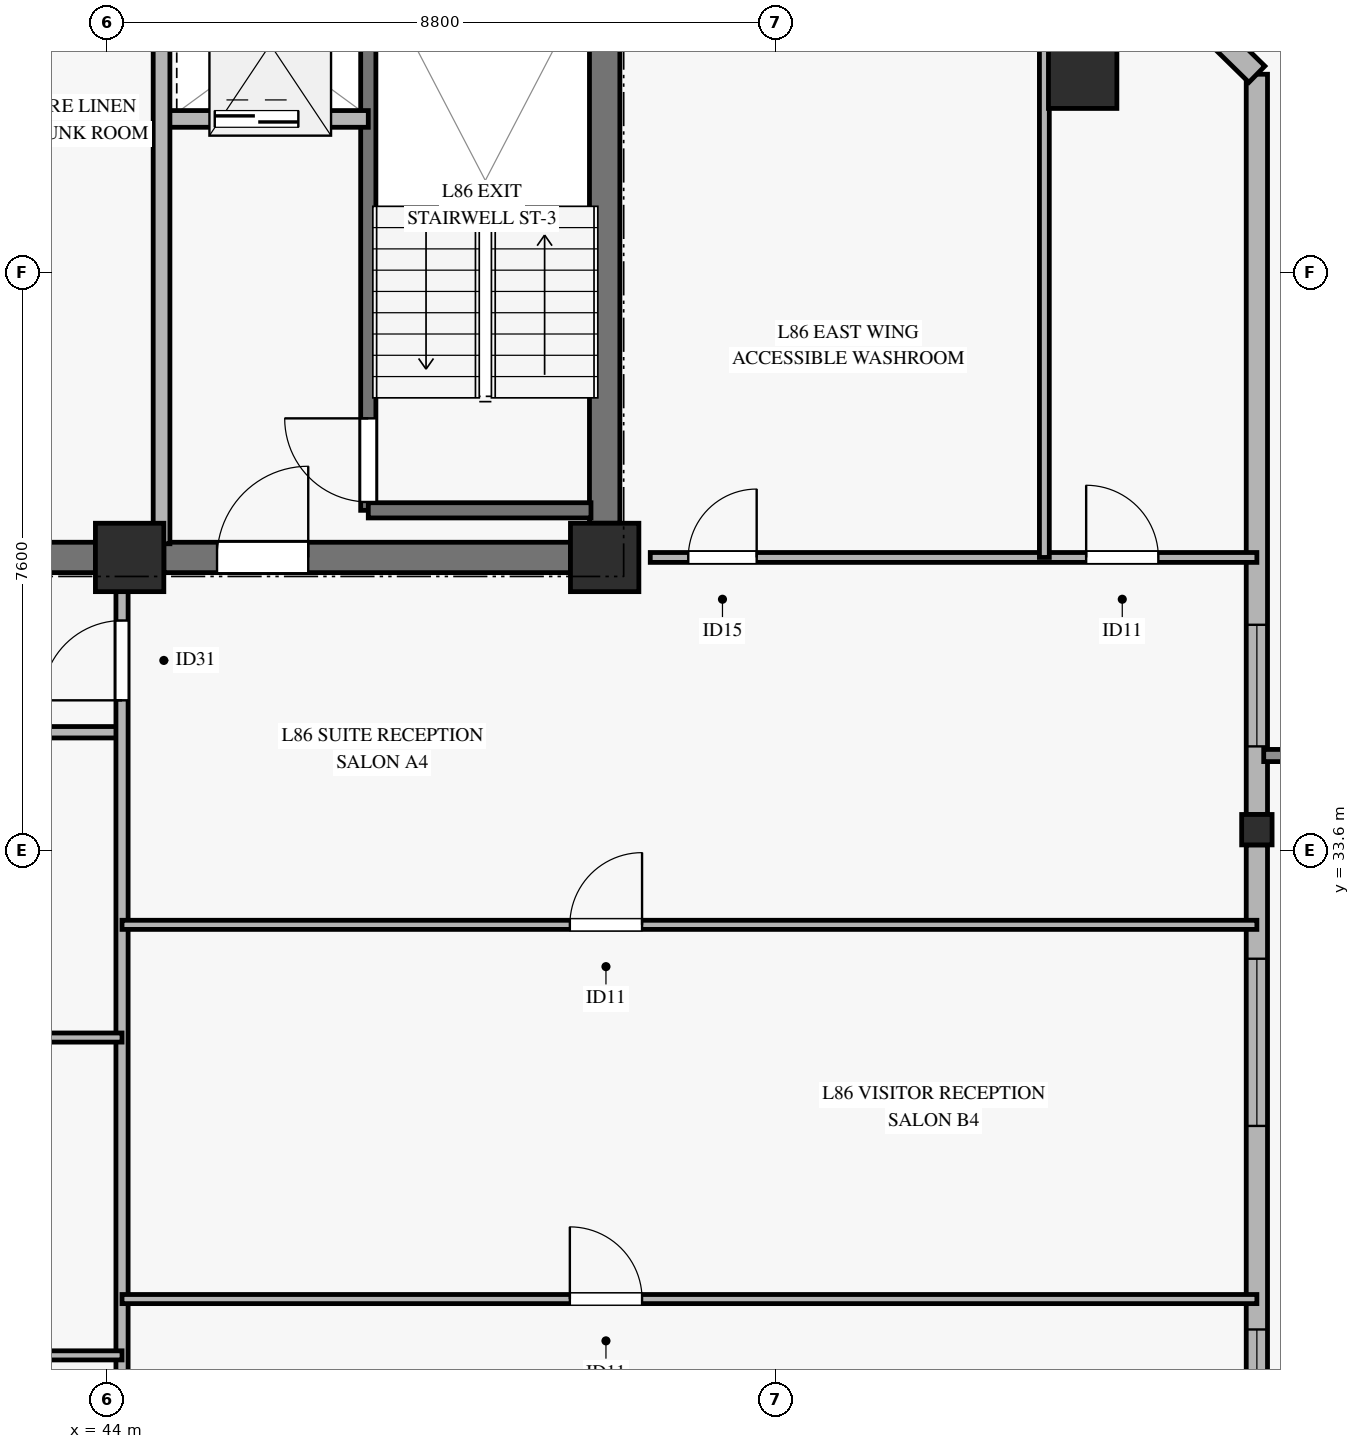
"""IFC4 building model, lengths in metres.
Left out: names, types, materials, properties, quantities, classifications, styles, units other than length and angle.
Written with IfcOpenShell. Run it as: python <this file> out.ifc"""

import sys

from ifc_helpers import new_model, si_unit, direction, frame, frame_2d, origin, origin_2d, place, context, subcontext, project, spatial, rectangle, hollow_rectangle, extrude, source, transform, mapped, element, fill, save


model = new_model("IFC4")
c1 = context("Model", 3, precision=1e-05, world=origin(), true_north=direction((0.0, 1.0)))
c2 = subcontext(c1, "Body", "Model", "MODEL_VIEW")
j1 = project(units=[si_unit("LENGTHUNIT", "METRE"), si_unit("PLANEANGLEUNIT", "RADIAN")], contexts=[c1])
p1 = place(None, origin())
s1 = spatial("IfcSite", under=j1, at=p1, CompositionType="ELEMENT")
p2 = place(p1, origin())
s2 = spatial("IfcBuilding", under=s1, at=p2, CompositionType="ELEMENT")
p3 = place(p2, frame((0.0, 0.0, 332.3)))
s3 = spatial("IfcBuildingStorey", under=s2, at=p3, CompositionType="ELEMENT", Elevation=332.3)
m1 = source(origin(), c2, "Body", "SweptSolid", [
    extrude(rectangle(XDim=0.9, YDim=0.9, at=origin_2d()), origin(), (0.0, 0.0, 1.0), 3.185),
])
for number, where, z_axis, x_axis in (
    (1, (44.3, 37.45, 0.0), (0.0, 0.0, 1.0), (1.0, 0.0, 0.0)),
    (2, (50.55, 37.45, 0.0), (0.0, 0.0, 1.0), (1.0, 0.0, 0.0)),
):
    element("IfcColumn", number, at=place(p3, frame(where, z_axis=z_axis, x_axis=x_axis)), inside=s3, PredefinedType="PILASTER", context=c2, shape_type="MappedRepresentation", body=[
        mapped(m1, transform((0.0, 0.0, 0.0), x_axis=(1.0, 0.0, 0.0), y_axis=(0.0, 1.0, 0.0), z_axis=(0.0, 0.0, 1.0), scale=1.0)),
    ])
p4 = place(p3, frame((36.05, 37.45, 0.0), z_axis=(0.0, 0.0, 1.0), x_axis=(1.0, 0.0, 0.0)))
e3 = element("IfcWall", 3, at=p4, inside=s3, PredefinedType="SHEAR", context=c2, shape_type="SweptSolid", body=[
    extrude(rectangle(XDim=7.8, YDim=0.4, at=frame_2d((3.9, 0.0))), origin(), (0.0, 0.0, 1.0), 3.185),
])
p5 = place(p3, frame((44.75, 37.45, 0.0), z_axis=(0.0, 0.0, 1.0), x_axis=(1.0, 0.0, 0.0)))
e4 = element("IfcWall", 4, at=p5, inside=s3, PredefinedType="SHEAR", context=c2, shape_type="SweptSolid", body=[
    extrude(rectangle(XDim=5.35, YDim=0.4, at=frame_2d((2.675, 0.0))), origin(), (0.0, 0.0, 1.0), 3.185),
])
p6 = place(p5, frame((0.7, 0.0, 0.0)))
e5 = element("IfcOpeningElement", 5, at=p6, cuts=e4, PredefinedType="OPENING", context=c2, shape_type="SweptSolid", body=[
    extrude(rectangle(XDim=1.2, YDim=2.15, at=frame_2d((0.6, 1.075))), frame((0.0, 0.21, 0.0), z_axis=(0.0, -1.0, 0.0), x_axis=(1.0, 0.0, 0.0)), (0.0, 0.0, 1.0), 0.42),
])
p7 = place(p3, frame((50.55, 37.9, 0.0), z_axis=(0.0, 0.0, 1.0), x_axis=(0.0, 1.0, 0.0)))
e6 = element("IfcWall", 6, at=p7, inside=s3, PredefinedType="SHEAR", context=c2, shape_type="SweptSolid", body=[
    extrude(rectangle(XDim=8.2, YDim=0.4, at=frame_2d((4.1, 0.0))), origin(), (0.0, 0.0, 1.0), 3.185),
])
m2 = source(origin(), c2, "Body", "SweptSolid", [
    extrude(hollow_rectangle(XDim=0.9, YDim=0.9, WallThickness=0.04, at=origin_2d()), origin(), (0.0, 0.0, 1.0), 3.207),
])
p8 = place(p3, frame((56.839, 43.808, 0.0), z_axis=(-0.1154156576, 0.01431275965, 0.993214161645), x_axis=(-0.123067857845, -0.992398257942, 0.0)))
e7 = element("IfcColumn", 7, at=p8, inside=s3, PredefinedType="COLUMN", context=c2, shape_type="MappedRepresentation", body=[
    mapped(m2, transform((0.0, 0.0, 0.0), x_axis=(1.0, 0.0, 0.0), y_axis=(0.0, 1.0, 0.0), z_axis=(0.0, 0.0, 1.0), scale=1.0)),
])
m3 = source(origin(), c2, "Body", "SweptSolid", [
    extrude(hollow_rectangle(XDim=0.4, YDim=0.4, WallThickness=0.02, at=origin_2d()), origin(), (0.0, 0.0, 1.0), 3.246),
])
p9 = place(p3, frame((59.131, 33.868, 0.0), z_axis=(-0.128172477041, 0.143592287953, 0.981301722698), x_axis=(-0.746027795602, -0.665914805504, 0.0)))
e8 = element("IfcColumn", 8, at=p9, inside=s3, PredefinedType="COLUMN", context=c2, shape_type="MappedRepresentation", body=[
    mapped(m3, transform((0.0, 0.0, 0.0), x_axis=(1.0, 0.0, 0.0), y_axis=(0.0, 1.0, 0.0), z_axis=(0.0, 0.0, 1.0), scale=1.0)),
])
p10 = place(p3, frame((59.131, 23.928, 0.0), z_axis=(0.0, 0.0, 1.0), x_axis=(0.0, 1.0, 0.0)))
e9 = element("IfcWall", 9, at=p10, inside=s3, PredefinedType="SOLIDWALL", context=c2, shape_type="SweptSolid", body=[
    extrude(rectangle(XDim=9.74, YDim=0.28, at=frame_2d((4.87, 0.0))), origin(), (0.0, 0.0, 1.0), 2.815),
])
p11 = place(p10, frame((1.164, 0.0, 0.45)))
e10 = element("IfcOpeningElement", 10, at=p11, cuts=e9, PredefinedType="OPENING", context=c2, shape_type="SweptSolid", body=[
    extrude(rectangle(XDim=2.2, YDim=2.1, at=frame_2d((1.1, 1.05))), frame((0.0, 0.15, 0.0), z_axis=(0.0, -1.0, 0.0), x_axis=(1.0, 0.0, 0.0)), (0.0, 0.0, 1.0), 0.3),
])
p12 = place(p10, frame((6.042, 0.0, 0.45)))
e11 = element("IfcOpeningElement", 11, at=p12, cuts=e9, PredefinedType="OPENING", context=c2, shape_type="SweptSolid", body=[
    extrude(rectangle(XDim=2.2, YDim=2.1, at=frame_2d((1.1, 1.05))), frame((0.0, 0.15, 0.0), z_axis=(0.0, -1.0, 0.0), x_axis=(1.0, 0.0, 0.0)), (0.0, 0.0, 1.0), 0.3),
])
p13 = place(p3, frame((59.131, 34.068, 0.0), z_axis=(0.0, 0.0, 1.0), x_axis=(0.0, 1.0, 0.0)))
e12 = element("IfcWall", 12, at=p13, inside=s3, PredefinedType="SOLIDWALL", context=c2, shape_type="SweptSolid", body=[
    extrude(rectangle(XDim=9.74, YDim=0.28, at=frame_2d((4.87, 0.0))), origin(), (0.0, 0.0, 1.0), 2.815),
])
p14 = place(p13, frame((0.896, 0.0, 0.45)))
e13 = element("IfcOpeningElement", 13, at=p14, cuts=e12, PredefinedType="OPENING", context=c2, shape_type="SweptSolid", body=[
    extrude(rectangle(XDim=1.6, YDim=2.0, at=frame_2d((0.8, 1.0))), frame((0.0, 0.15, 0.0), z_axis=(0.0, -1.0, 0.0), x_axis=(1.0, 0.0, 0.0)), (0.0, 0.0, 1.0), 0.3),
])
p15 = place(p3, frame((59.131, 43.808, 0.0), z_axis=(0.0, 0.0, 1.0), x_axis=(-0.7142771975, 0.699862904526, 0.0)))
e14 = element("IfcWall", 14, at=p15, inside=s3, PredefinedType="SOLIDWALL", context=c2, shape_type="SweptSolid", body=[
    extrude(rectangle(XDim=3.489, YDim=0.3, at=frame_2d((1.745, 0.0))), origin(), (0.0, 0.0, 1.0), 2.815),
])
p16 = place(p15, frame((0.945, 0.0, 0.45)))
e15 = element("IfcOpeningElement", 15, at=p16, cuts=e14, PredefinedType="OPENING", context=c2, shape_type="SweptSolid", body=[
    extrude(rectangle(XDim=1.6, YDim=2.0, at=frame_2d((0.8, 1.0))), frame((0.0, 0.16, 0.0), z_axis=(0.0, -1.0, 0.0), x_axis=(1.0, 0.0, 0.0)), (0.0, 0.0, 1.0), 0.32),
])
p17 = place(p3, frame((47.44, 38.07, 0.0), z_axis=(0.0, 0.0, 1.0), x_axis=(0.0, 1.0, 0.0)))
e16 = element("IfcWall", 16, at=p17, inside=s3, PredefinedType="SOLIDWALL", context=c2, shape_type="SweptSolid", body=[
    extrude(rectangle(XDim=7.25, YDim=0.2, at=frame_2d((3.625, 0.0))), origin(), (0.0, 0.0, 1.0), 3.4),
])
p18 = place(p17, frame((0.11, 0.0, 0.0)))
e17 = element("IfcOpeningElement", 17, at=p18, cuts=e16, PredefinedType="OPENING", context=c2, shape_type="SweptSolid", body=[
    extrude(rectangle(XDim=1.1, YDim=2.15, at=frame_2d((0.55, 1.075))), frame((0.0, 0.11, 0.0), z_axis=(0.0, -1.0, 0.0), x_axis=(1.0, 0.0, 0.0)), (0.0, 0.0, 1.0), 0.22),
])
p19 = place(p3, frame((47.44, 38.07, 0.0), z_axis=(0.0, 0.0, 1.0), x_axis=(1.0, 0.0, 0.0)))
e18 = element("IfcWall", 18, at=p19, inside=s3, PredefinedType="SOLIDWALL", context=c2, shape_type="SweptSolid", body=[
    extrude(rectangle(XDim=2.93, YDim=0.2, at=frame_2d((1.465, 0.0))), origin(), (0.0, 0.0, 1.0), 3.4),
])
p20 = place(p3, frame((44.72, 43.22, 0.0), z_axis=(0.0, 0.0, 1.0), x_axis=(1.0, 0.0, 0.0)))
e19 = element("IfcWall", 19, at=p20, inside=s3, PredefinedType="SOLIDWALL", context=c2, shape_type="SweptSolid", body=[
    extrude(rectangle(XDim=2.72, YDim=0.22, at=frame_2d((1.36, 0.0))), origin(), (0.0, 0.0, 1.0), 3.185),
])
p21 = place(p20, frame((0.7, 0.0, 0.0)))
e20 = element("IfcOpeningElement", 20, at=p21, cuts=e19, PredefinedType="OPENING", context=c2, shape_type="SweptSolid", body=[
    extrude(rectangle(XDim=1.1, YDim=2.2, at=frame_2d((0.55, 1.1))), frame((0.0, 0.12, 0.0), z_axis=(0.0, -1.0, 0.0), x_axis=(1.0, 0.0, 0.0)), (0.0, 0.0, 1.0), 0.24),
])
p22 = place(p3, frame((44.72, 37.63, 0.0), z_axis=(0.0, 0.0, 1.0), x_axis=(0.0, 1.0, 0.0)))
e21 = element("IfcWall", 21, at=p22, inside=s3, PredefinedType="SOLIDWALL", context=c2, shape_type="SweptSolid", body=[
    extrude(rectangle(XDim=7.59, YDim=0.22, at=frame_2d((3.795, 0.0))), origin(), (0.0, 0.0, 1.0), 3.185),
])
p23 = place(p3, frame((21.0, 35.15, 0.0), z_axis=(0.0, 0.0, 1.0), x_axis=(1.0, 0.0, 0.0)))
e22 = element("IfcWall", 22, at=p23, inside=s3, PredefinedType="PARTITIONING", context=c2, shape_type="SweptSolid", body=[
    extrude(rectangle(XDim=23.2, YDim=0.15, at=frame_2d((11.6, 0.0))), origin(), (0.0, 0.0, 1.0), 2.47),
])
p24 = place(p23, frame((4.577, 0.0, 0.0)))
e23 = element("IfcOpeningElement", 23, at=p24, cuts=e22, PredefinedType="OPENING", context=c2, shape_type="SweptSolid", body=[
    extrude(rectangle(XDim=1.05, YDim=2.15, at=frame_2d((0.525, 1.075))), frame((0.0, 0.085, 0.0), z_axis=(0.0, -1.0, 0.0), x_axis=(1.0, 0.0, 0.0)), (0.0, 0.0, 1.0), 0.17),
])
p25 = place(p23, frame((16.177, 0.0, 0.0)))
e24 = element("IfcOpeningElement", 24, at=p25, cuts=e22, PredefinedType="OPENING", context=c2, shape_type="SweptSolid", body=[
    extrude(rectangle(XDim=1.05, YDim=2.15, at=frame_2d((0.525, 1.075))), frame((0.0, 0.085, 0.0), z_axis=(0.0, -1.0, 0.0), x_axis=(1.0, 0.0, 0.0)), (0.0, 0.0, 1.0), 0.17),
])
p26 = place(p3, frame((44.2, 21.636, 0.0), z_axis=(0.0, 0.0, 1.0), x_axis=(0.0, 1.0, 0.0)))
e25 = element("IfcWall", 25, at=p26, inside=s3, PredefinedType="PARTITIONING", context=c2, shape_type="SweptSolid", body=[
    extrude(rectangle(XDim=15.814, YDim=0.16, at=frame_2d((7.907, 0.0))), origin(), (0.0, 0.0, 1.0), 2.47),
])
p27 = place(p26, frame((13.934, 0.0, 0.0)))
e26 = element("IfcOpeningElement", 26, at=p27, cuts=e25, PredefinedType="OPENING", context=c2, shape_type="SweptSolid", body=[
    extrude(rectangle(XDim=1.05, YDim=2.15, at=frame_2d((0.525, 1.075))), frame((0.0, 0.09, 0.0), z_axis=(0.0, -1.0, 0.0), x_axis=(1.0, 0.0, 0.0)), (0.0, 0.0, 1.0), 0.18),
])
p28 = place(p3, frame((32.6, 26.951, 0.0), z_axis=(0.0, 0.0, 1.0), x_axis=(1.0, 0.0, 0.0)))
e27 = element("IfcWall", 27, at=p28, inside=s3, PredefinedType="PARTITIONING", context=c2, shape_type="SweptSolid", body=[
    extrude(rectangle(XDim=11.6, YDim=0.12, at=frame_2d((5.8, 0.0))), origin(), (0.0, 0.0, 1.0), 2.47),
])
p29 = place(p28, frame((4.806, 0.0, 0.0)))
e28 = element("IfcOpeningElement", 28, at=p29, cuts=e27, PredefinedType="OPENING", context=c2, shape_type="SweptSolid", body=[
    extrude(rectangle(XDim=0.95, YDim=2.1, at=frame_2d((0.475, 1.05))), frame((0.0, 0.07, 0.0), z_axis=(0.0, -1.0, 0.0), x_axis=(1.0, 0.0, 0.0)), (0.0, 0.0, 1.0), 0.14),
])
p30 = place(p3, frame((32.6, 31.133, 0.0), z_axis=(0.0, 0.0, 1.0), x_axis=(1.0, 0.0, 0.0)))
e29 = element("IfcWall", 29, at=p30, inside=s3, PredefinedType="PARTITIONING", context=c2, shape_type="SweptSolid", body=[
    extrude(rectangle(XDim=11.6, YDim=0.12, at=frame_2d((5.8, 0.0))), origin(), (0.0, 0.0, 1.0), 2.47),
])
p31 = place(p30, frame((4.806, 0.0, 0.0)))
e30 = element("IfcOpeningElement", 30, at=p31, cuts=e29, PredefinedType="OPENING", context=c2, shape_type="SweptSolid", body=[
    extrude(rectangle(XDim=0.95, YDim=2.1, at=frame_2d((0.475, 1.05))), frame((0.0, 0.07, 0.0), z_axis=(0.0, -1.0, 0.0), x_axis=(1.0, 0.0, 0.0)), (0.0, 0.0, 1.0), 0.14),
])
p32 = place(p3, frame((44.2, 27.692, 0.0), z_axis=(0.0, 0.0, 1.0), x_axis=(1.0, 0.0, 0.0)))
e31 = element("IfcWall", 31, at=p32, inside=s3, PredefinedType="PARTITIONING", context=c2, shape_type="SweptSolid", body=[
    extrude(rectangle(XDim=14.931, YDim=0.12, at=frame_2d((7.466, 0.0))), origin(), (0.0, 0.0, 1.0), 2.47),
])
p33 = place(p32, frame((5.892, 0.0, 0.0)))
e32 = element("IfcOpeningElement", 32, at=p33, cuts=e31, PredefinedType="OPENING", context=c2, shape_type="SweptSolid", body=[
    extrude(rectangle(XDim=0.95, YDim=2.1, at=frame_2d((0.475, 1.05))), frame((0.0, 0.07, 0.0), z_axis=(0.0, -1.0, 0.0), x_axis=(1.0, 0.0, 0.0)), (0.0, 0.0, 1.0), 0.14),
])
p34 = place(p3, frame((44.2, 32.616, 0.0), z_axis=(0.0, 0.0, 1.0), x_axis=(1.0, 0.0, 0.0)))
e33 = element("IfcWall", 33, at=p34, inside=s3, PredefinedType="PARTITIONING", context=c2, shape_type="SweptSolid", body=[
    extrude(rectangle(XDim=14.931, YDim=0.12, at=frame_2d((7.466, 0.0))), origin(), (0.0, 0.0, 1.0), 2.47),
])
p35 = place(p34, frame((5.892, 0.0, 0.0)))
e34 = element("IfcOpeningElement", 34, at=p35, cuts=e33, PredefinedType="OPENING", context=c2, shape_type="SweptSolid", body=[
    extrude(rectangle(XDim=0.95, YDim=2.1, at=frame_2d((0.475, 1.05))), frame((0.0, 0.07, 0.0), z_axis=(0.0, -1.0, 0.0), x_axis=(1.0, 0.0, 0.0)), (0.0, 0.0, 1.0), 0.14),
])
p36 = place(p3, frame((51.15, 37.45, 0.0), z_axis=(0.0, 0.0, 1.0), x_axis=(1.0, 0.0, 0.0)))
e35 = element("IfcWall", 35, at=p36, inside=s3, PredefinedType="PARTITIONING", context=c2, shape_type="SweptSolid", body=[
    extrude(rectangle(XDim=7.981, YDim=0.13, at=frame_2d((3.991, 0.0))), origin(), (0.0, 0.0, 1.0), 2.82),
])
p37 = place(p36, frame((0.5, 0.0, 0.0)))
e36 = element("IfcOpeningElement", 36, at=p37, cuts=e35, PredefinedType="OPENING", context=c2, shape_type="SweptSolid", body=[
    extrude(rectangle(XDim=0.9, YDim=2.1, at=frame_2d((0.45, 1.05))), frame((0.0, 0.075, 0.0), z_axis=(0.0, -1.0, 0.0), x_axis=(1.0, 0.0, 0.0)), (0.0, 0.0, 1.0), 0.15),
])
p38 = place(p36, frame((5.735, 0.0, 0.0)))
e37 = element("IfcOpeningElement", 37, at=p38, cuts=e35, PredefinedType="OPENING", context=c2, shape_type="SweptSolid", body=[
    extrude(rectangle(XDim=0.95, YDim=2.1, at=frame_2d((0.475, 1.05))), frame((0.0, 0.075, 0.0), z_axis=(0.0, -1.0, 0.0), x_axis=(1.0, 0.0, 0.0)), (0.0, 0.0, 1.0), 0.15),
])
p39 = place(p3, frame((56.335, 37.45, 0.0), z_axis=(0.0, 0.0, 1.0), x_axis=(0.0, 1.0, 0.0)))
e38 = element("IfcWall", 38, at=p39, inside=s3, PredefinedType="PARTITIONING", context=c2, shape_type="SweptSolid", body=[
    extrude(rectangle(XDim=8.8, YDim=0.13, at=frame_2d((4.4, 0.0))), origin(), (0.0, 0.0, 1.0), 2.82),
])
m4 = source(origin(), c2, "Body", "SweptSolid", [
    extrude(rectangle(XDim=2.2, YDim=2.1, at=frame_2d((1.1, 1.05))), frame((0.0, 0.03, 0.0), z_axis=(0.0, -1.0, 0.0), x_axis=(1.0, 0.0, 0.0)), (0.0, 0.0, 1.0), 0.06),
])
p40 = place(p11, origin())
e39 = element("IfcWindow", 39, at=p40, inside=s3, PartitioningType="SINGLE_PANEL", PredefinedType="WINDOW", context=c2, shape_type="MappedRepresentation", body=[
    mapped(m4, transform((0.0, 0.0, 0.0), x_axis=(1.0, 0.0, 0.0), y_axis=(0.0, 1.0, 0.0), z_axis=(0.0, 0.0, 1.0), scale=1.0)),
])
fill(e10, e39)
p41 = place(p12, origin())
e40 = element("IfcWindow", 40, at=p41, inside=s3, PartitioningType="SINGLE_PANEL", PredefinedType="WINDOW", context=c2, shape_type="MappedRepresentation", body=[
    mapped(m4, transform((0.0, 0.0, 0.0), x_axis=(1.0, 0.0, 0.0), y_axis=(0.0, 1.0, 0.0), z_axis=(0.0, 0.0, 1.0), scale=1.0)),
])
fill(e11, e40)
m5 = source(origin(), c2, "Body", "SweptSolid", [
    extrude(rectangle(XDim=1.6, YDim=2.0, at=frame_2d((0.8, 1.0))), frame((0.0, 0.03, 0.0), z_axis=(0.0, -1.0, 0.0), x_axis=(1.0, 0.0, 0.0)), (0.0, 0.0, 1.0), 0.06),
])
p42 = place(p14, origin())
e41 = element("IfcWindow", 41, at=p42, inside=s3, PartitioningType="SINGLE_PANEL", PredefinedType="WINDOW", context=c2, shape_type="MappedRepresentation", body=[
    mapped(m5, transform((0.0, 0.0, 0.0), x_axis=(1.0, 0.0, 0.0), y_axis=(0.0, 1.0, 0.0), z_axis=(0.0, 0.0, 1.0), scale=1.0)),
])
fill(e13, e41)
m6 = source(origin(), c2, "Body", "SweptSolid", [
    extrude(rectangle(XDim=1.1, YDim=2.15, at=frame_2d((0.55, 1.075))), frame((0.0, 0.025, 0.0), z_axis=(0.0, -1.0, 0.0), x_axis=(1.0, 0.0, 0.0)), (0.0, 0.0, 1.0), 0.05),
])
p43 = place(p18, origin())
e42 = element("IfcDoor", 42, at=p43, inside=s3, OperationType="SINGLE_SWING_RIGHT", PredefinedType="DOOR", context=c2, shape_type="MappedRepresentation", body=[
    mapped(m6, transform((0.0, 0.0, 0.0), x_axis=(1.0, 0.0, 0.0), y_axis=(0.0, 1.0, 0.0), z_axis=(0.0, 0.0, 1.0), scale=1.0)),
])
fill(e17, e42)
m7 = source(origin(), c2, "Body", "SweptSolid", [
    extrude(rectangle(XDim=1.1, YDim=2.2, at=frame_2d((0.55, 1.1))), frame((0.0, 0.025, 0.0), z_axis=(0.0, -1.0, 0.0), x_axis=(1.0, 0.0, 0.0)), (0.0, 0.0, 1.0), 0.05),
])
p44 = place(p21, origin())
e43 = element("IfcDoor", 43, at=p44, inside=s3, OperationType="SLIDING_TO_LEFT", PredefinedType="DOOR", context=c2, shape_type="MappedRepresentation", body=[
    mapped(m7, transform((0.0, 0.0, 0.0), x_axis=(1.0, 0.0, 0.0), y_axis=(0.0, 1.0, 0.0), z_axis=(0.0, 0.0, 1.0), scale=1.0)),
])
fill(e20, e43)
m8 = source(origin(), c2, "Body", "SweptSolid", [
    extrude(rectangle(XDim=1.2, YDim=2.15, at=frame_2d((0.6, 1.075))), frame((0.0, 0.025, 0.0), z_axis=(0.0, -1.0, 0.0), x_axis=(1.0, 0.0, 0.0)), (0.0, 0.0, 1.0), 0.05),
])
p45 = place(p6, origin())
e44 = element("IfcDoor", 44, at=p45, inside=s3, OperationType="SINGLE_SWING_RIGHT", PredefinedType="DOOR", context=c2, shape_type="MappedRepresentation", body=[
    mapped(m8, transform((0.0, 0.0, 0.0), x_axis=(1.0, 0.0, 0.0), y_axis=(0.0, 1.0, 0.0), z_axis=(0.0, 0.0, 1.0), scale=1.0)),
])
fill(e5, e44)
m9 = source(origin(), c2, "Body", "SweptSolid", [
    extrude(rectangle(XDim=1.05, YDim=2.15, at=frame_2d((0.525, 1.075))), frame((0.0, 0.025, 0.0), z_axis=(0.0, -1.0, 0.0), x_axis=(1.0, 0.0, 0.0)), (0.0, 0.0, 1.0), 0.05),
])
p46 = place(p27, origin())
e45 = element("IfcDoor", 45, at=p46, inside=s3, OperationType="SINGLE_SWING_LEFT", PredefinedType="DOOR", context=c2, shape_type="MappedRepresentation", body=[
    mapped(m9, transform((0.0, 0.0, 0.0), x_axis=(1.0, 0.0, 0.0), y_axis=(0.0, 1.0, 0.0), z_axis=(0.0, 0.0, 1.0), scale=1.0)),
])
fill(e26, e45)
m10 = source(origin(), c2, "Body", "SweptSolid", [
    extrude(rectangle(XDim=0.95, YDim=2.1, at=frame_2d((0.475, 1.05))), frame((0.0, 0.025, 0.0), z_axis=(0.0, -1.0, 0.0), x_axis=(1.0, 0.0, 0.0)), (0.0, 0.0, 1.0), 0.05),
])
p47 = place(p35, origin())
e46 = element("IfcDoor", 46, at=p47, inside=s3, OperationType="SINGLE_SWING_RIGHT", PredefinedType="DOOR", context=c2, shape_type="MappedRepresentation", body=[
    mapped(m10, transform((0.0, 0.0, 0.0), x_axis=(1.0, 0.0, 0.0), y_axis=(0.0, 1.0, 0.0), z_axis=(0.0, 0.0, 1.0), scale=1.0)),
])
fill(e34, e46)
p48 = place(p33, origin())
e47 = element("IfcDoor", 47, at=p48, inside=s3, OperationType="SINGLE_SWING_LEFT", PredefinedType="DOOR", context=c2, shape_type="MappedRepresentation", body=[
    mapped(m10, transform((0.0, 0.0, 0.0), x_axis=(1.0, 0.0, 0.0), y_axis=(0.0, 1.0, 0.0), z_axis=(0.0, 0.0, 1.0), scale=1.0)),
])
fill(e32, e47)
m11 = source(origin(), c2, "Body", "SweptSolid", [
    extrude(rectangle(XDim=0.9, YDim=2.1, at=frame_2d((0.45, 1.05))), frame((0.0, 0.025, 0.0), z_axis=(0.0, -1.0, 0.0), x_axis=(1.0, 0.0, 0.0)), (0.0, 0.0, 1.0), 0.05),
])
p49 = place(p37, origin())
e48 = element("IfcDoor", 48, at=p49, inside=s3, OperationType="SINGLE_SWING_RIGHT", PredefinedType="DOOR", context=c2, shape_type="MappedRepresentation", body=[
    mapped(m11, transform((0.0, 0.0, 0.0), x_axis=(1.0, 0.0, 0.0), y_axis=(0.0, 1.0, 0.0), z_axis=(0.0, 0.0, 1.0), scale=1.0)),
])
fill(e36, e48)
p50 = place(p38, origin())
e49 = element("IfcDoor", 49, at=p50, inside=s3, OperationType="SINGLE_SWING_LEFT", PredefinedType="DOOR", context=c2, shape_type="MappedRepresentation", body=[
    mapped(m10, transform((0.0, 0.0, 0.0), x_axis=(1.0, 0.0, 0.0), y_axis=(0.0, 1.0, 0.0), z_axis=(0.0, 0.0, 1.0), scale=1.0)),
])
fill(e37, e49)
save(model, sys.argv[1])
